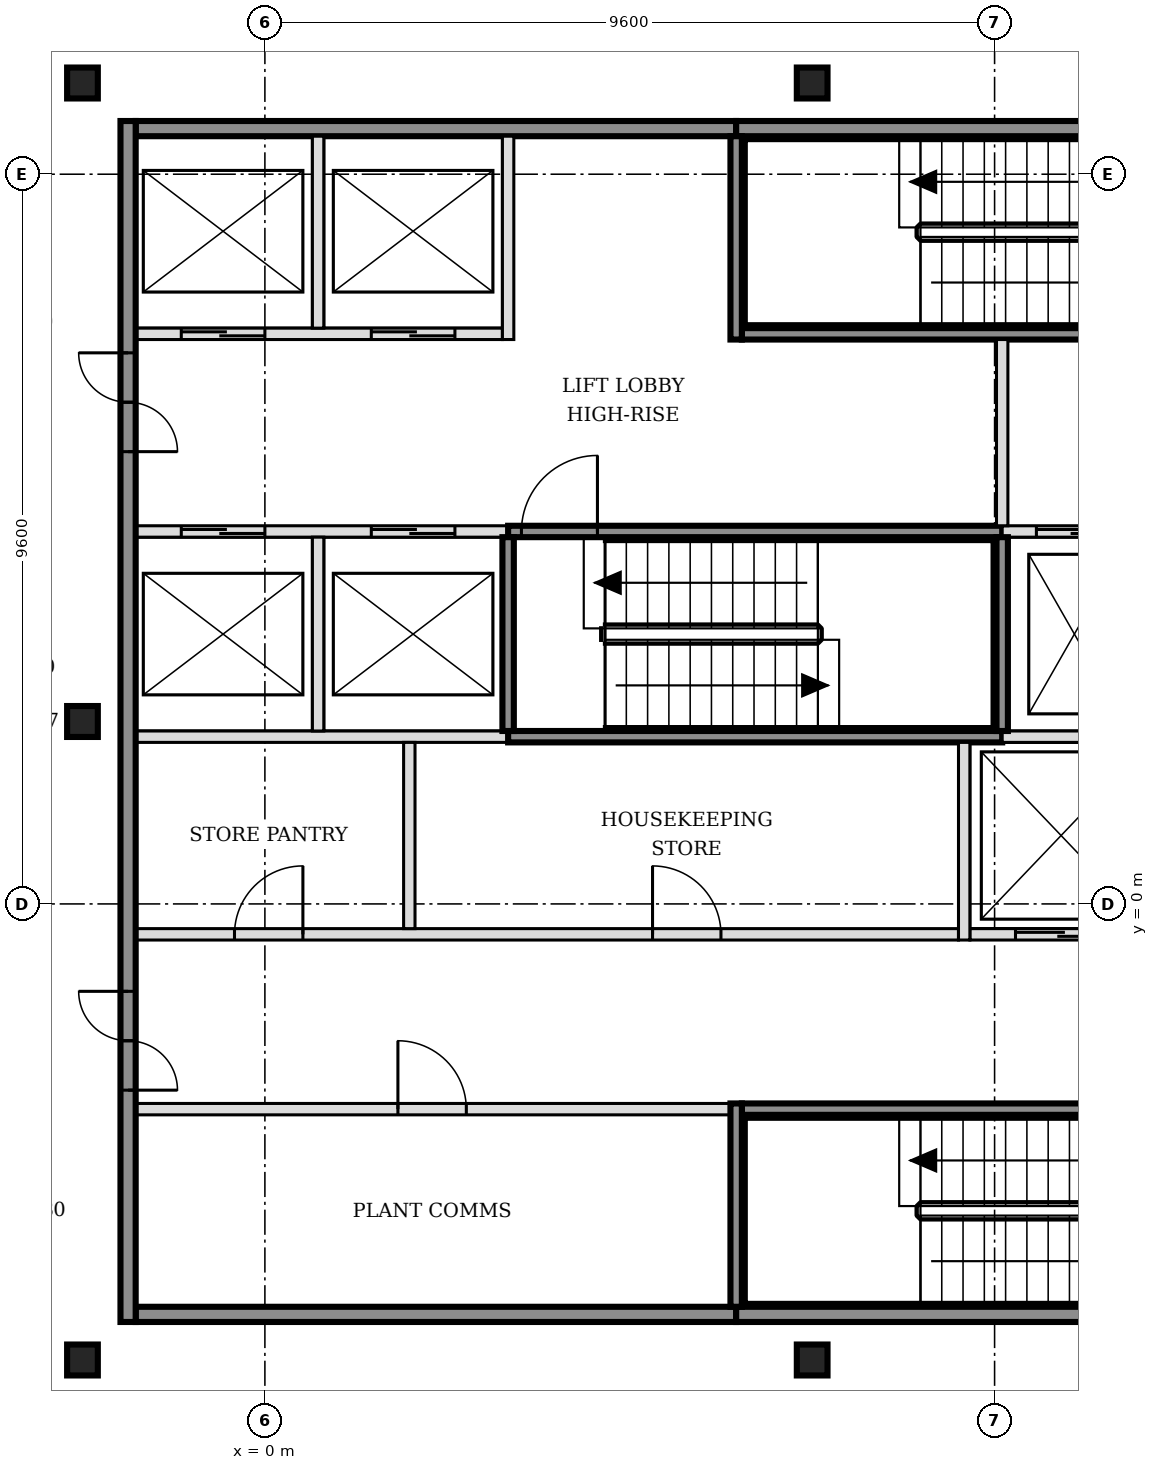
"""IFC4 building model, lengths in metres.
Left out: names, types, materials, properties, quantities, classifications, styles, units other than length and angle.
Written with IfcOpenShell. Run it as: python <this file> out.ifc"""

import sys

from ifc_helpers import new_model, si_unit, direction, frame, frame_2d, origin, origin_2d, place, context, subcontext, project, spatial, rectangle, i_section, extrude, element, fill, save


model = new_model("IFC4")
c1 = context("Model", 3, precision=1e-05, world=origin(), true_north=direction((0.0, 1.0)))
c2 = subcontext(c1, "Body", "Model", "MODEL_VIEW")
j1 = project(units=[si_unit("LENGTHUNIT", "METRE"), si_unit("PLANEANGLEUNIT", "RADIAN")], contexts=[c1])
p1 = place(None, origin())
s1 = spatial("IfcSite", under=j1, at=p1, CompositionType="ELEMENT")
p2 = place(p1, origin())
s2 = spatial("IfcBuilding", under=s1, at=p2, CompositionType="ELEMENT")
p3 = place(p2, frame((0.0, 0.0, 214.2)))
s3 = spatial("IfcBuildingStorey", under=s2, at=p3, CompositionType="ELEMENT", Elevation=214.2)
for number, where, z_axis, x_axis in (
    (1, (-2.4, -6.0, -0.15), (0.0, 0.0, 1.0), (1.0, 0.0, 0.0)),
    (2, (7.2, -6.0, -0.15), (0.0, 0.0, 1.0), (1.0, 0.0, 0.0)),
    (3, (-2.4, 2.4, -0.15), (0.0, 0.0, 1.0), (1.0, 0.0, 0.0)),
    (4, (-2.4, 10.8, -0.15), (0.0, 0.0, 1.0), (1.0, 0.0, 0.0)),
    (5, (7.2, 10.8, -0.15), (0.0, 0.0, 1.0), (1.0, 0.0, 0.0)),
):
    element("IfcColumn", number, at=place(p3, frame(where, z_axis=z_axis, x_axis=x_axis)), inside=s3, PredefinedType="COLUMN", context=c2, shape_type="SweptSolid", body=[
        extrude(i_section(OverallWidth=0.404, OverallDepth=0.407, WebThickness=0.027, FlangeThickness=0.044, FilletRadius=0.015, at=origin_2d()), origin(), (0.0, 0.0, 1.0), 3.6),
    ])
p4 = place(p3, frame((-1.7, -5.4, 0.0), z_axis=(0.0, 0.0, 1.0), x_axis=(1.0, 0.0, 0.0)))
e6 = element("IfcWall", 6, at=p4, inside=s3, PredefinedType="SOLIDWALL", context=c2, shape_type="SweptSolid", body=[
    extrude(rectangle(XDim=7.9, YDim=0.2, at=frame_2d((3.95, 0.0))), origin(), (0.0, 0.0, 1.0), 3.45),
])
p5 = place(p3, frame((6.2, -5.4, 0.0), z_axis=(0.0, 0.0, 1.0), x_axis=(1.0, 0.0, 0.0)))
e7 = element("IfcWall", 7, at=p5, inside=s3, PredefinedType="SOLIDWALL", context=c2, shape_type="SweptSolid", body=[
    extrude(rectangle(XDim=6.5, YDim=0.2, at=frame_2d((3.25, 0.0))), origin(), (0.0, 0.0, 1.0), 3.45),
])
p6 = place(p3, frame((-1.7, -2.7, 0.0), z_axis=(0.0, 0.0, 1.0), x_axis=(1.0, 0.0, 0.0)))
e8 = element("IfcWall", 8, at=p6, inside=s3, PredefinedType="PARTITIONING", context=c2, shape_type="SweptSolid", body=[
    extrude(rectangle(XDim=7.825, YDim=0.15, at=frame_2d((3.913, 0.0))), origin(), (0.0, 0.0, 1.0), 3.45),
])
p7 = place(p6, frame((3.45, 0.0, 0.0)))
e9 = element("IfcOpeningElement", 9, at=p7, cuts=e8, PredefinedType="OPENING", context=c2, shape_type="SweptSolid", body=[
    extrude(rectangle(XDim=0.9, YDim=2.1, at=frame_2d((0.45, 1.05))), frame((0.0, 0.085, 0.0), z_axis=(0.0, -1.0, 0.0), x_axis=(1.0, 0.0, 0.0)), (0.0, 0.0, 1.0), 0.17),
])
p8 = place(p3, frame((6.275, -2.7, 0.0), z_axis=(0.0, 0.0, 1.0), x_axis=(1.0, 0.0, 0.0)))
e10 = element("IfcWall", 10, at=p8, inside=s3, PredefinedType="SOLIDWALL", context=c2, shape_type="SweptSolid", body=[
    extrude(rectangle(XDim=6.35, YDim=0.15, at=frame_2d((3.175, 0.0))), origin(), (0.0, 0.0, 1.0), 3.45),
])
p9 = place(p8, frame((5.225, 0.0, 0.0)))
e11 = element("IfcOpeningElement", 11, at=p9, cuts=e10, PredefinedType="OPENING", context=c2, shape_type="SweptSolid", body=[
    extrude(rectangle(XDim=1.0, YDim=2.1, at=frame_2d((0.5, 1.05))), frame((0.0, 0.085, 0.0), z_axis=(0.0, -1.0, 0.0), x_axis=(1.0, 0.0, 0.0)), (0.0, 0.0, 1.0), 0.17),
])
p10 = place(p3, frame((-1.7, -0.4, 0.0), z_axis=(0.0, 0.0, 1.0), x_axis=(1.0, 0.0, 0.0)))
e12 = element("IfcWall", 12, at=p10, inside=s3, PredefinedType="PARTITIONING", context=c2, shape_type="SweptSolid", body=[
    extrude(rectangle(XDim=10.825, YDim=0.15, at=frame_2d((5.413, 0.0))), origin(), (0.0, 0.0, 1.0), 3.45),
])
p11 = place(p10, frame((1.3, 0.0, 0.0)))
e13 = element("IfcOpeningElement", 13, at=p11, cuts=e12, PredefinedType="OPENING", context=c2, shape_type="SweptSolid", body=[
    extrude(rectangle(XDim=0.9, YDim=2.1, at=frame_2d((0.45, 1.05))), frame((0.0, 0.085, 0.0), z_axis=(0.0, -1.0, 0.0), x_axis=(1.0, 0.0, 0.0)), (0.0, 0.0, 1.0), 0.17),
])
p12 = place(p10, frame((6.8, 0.0, 0.0)))
e14 = element("IfcOpeningElement", 14, at=p12, cuts=e12, PredefinedType="OPENING", context=c2, shape_type="SweptSolid", body=[
    extrude(rectangle(XDim=0.9, YDim=2.1, at=frame_2d((0.45, 1.05))), frame((0.0, 0.085, 0.0), z_axis=(0.0, -1.0, 0.0), x_axis=(1.0, 0.0, 0.0)), (0.0, 0.0, 1.0), 0.17),
])
p13 = place(p3, frame((9.275, -0.4, 0.0), z_axis=(0.0, 0.0, 1.0), x_axis=(1.0, 0.0, 0.0)))
e15 = element("IfcWall", 15, at=p13, inside=s3, PredefinedType="SOLIDWALL", context=c2, shape_type="SweptSolid", body=[
    extrude(rectangle(XDim=4.95, YDim=0.15, at=frame_2d((2.475, 0.0))), origin(), (0.0, 0.0, 1.0), 3.45),
])
p14 = place(p13, frame((0.6, 0.0, 0.0)))
e16 = element("IfcOpeningElement", 16, at=p14, cuts=e15, PredefinedType="OPENING", context=c2, shape_type="SweptSolid", body=[
    extrude(rectangle(XDim=1.2, YDim=2.1, at=frame_2d((0.6, 1.05))), frame((0.0, 0.085, 0.0), z_axis=(0.0, -1.0, 0.0), x_axis=(1.0, 0.0, 0.0)), (0.0, 0.0, 1.0), 0.17),
])
p15 = place(p13, frame((3.15, 0.0, 0.0)))
e17 = element("IfcOpeningElement", 17, at=p15, cuts=e15, PredefinedType="OPENING", context=c2, shape_type="SweptSolid", body=[
    extrude(rectangle(XDim=1.2, YDim=2.1, at=frame_2d((0.6, 1.05))), frame((0.0, 0.085, 0.0), z_axis=(0.0, -1.0, 0.0), x_axis=(1.0, 0.0, 0.0)), (0.0, 0.0, 1.0), 0.17),
])
p16 = place(p3, frame((-1.7, 2.2, 0.0), z_axis=(0.0, 0.0, 1.0), x_axis=(1.0, 0.0, 0.0)))
e18 = element("IfcWall", 18, at=p16, inside=s3, PredefinedType="SOLIDWALL", context=c2, shape_type="SweptSolid", body=[
    extrude(rectangle(XDim=4.9, YDim=0.15, at=frame_2d((2.45, 0.0))), origin(), (0.0, 0.0, 1.0), 3.45),
])
p17 = place(p3, frame((3.2, 2.2, 0.0), z_axis=(0.0, 0.0, 1.0), x_axis=(1.0, 0.0, 0.0)))
e19 = element("IfcWall", 19, at=p17, inside=s3, PredefinedType="SOLIDWALL", context=c2, shape_type="SweptSolid", body=[
    extrude(rectangle(XDim=6.5, YDim=0.15, at=frame_2d((3.25, 0.0))), origin(), (0.0, 0.0, 1.0), 3.45),
])
p18 = place(p3, frame((9.7, 2.2, 0.0), z_axis=(0.0, 0.0, 1.0), x_axis=(1.0, 0.0, 0.0)))
e20 = element("IfcWall", 20, at=p18, inside=s3, PredefinedType="SOLIDWALL", context=c2, shape_type="SweptSolid", body=[
    extrude(rectangle(XDim=4.525, YDim=0.15, at=frame_2d((2.263, 0.0))), origin(), (0.0, 0.0, 1.0), 3.45),
])
p19 = place(p3, frame((-1.7, 4.9, 0.0), z_axis=(0.0, 0.0, 1.0), x_axis=(1.0, 0.0, 0.0)))
e21 = element("IfcWall", 21, at=p19, inside=s3, PredefinedType="SOLIDWALL", context=c2, shape_type="SweptSolid", body=[
    extrude(rectangle(XDim=4.9, YDim=0.15, at=frame_2d((2.45, 0.0))), origin(), (0.0, 0.0, 1.0), 3.45),
])
p20 = place(p19, frame((0.6, 0.0, 0.0)))
e22 = element("IfcOpeningElement", 22, at=p20, cuts=e21, PredefinedType="OPENING", context=c2, shape_type="SweptSolid", body=[
    extrude(rectangle(XDim=1.1, YDim=2.1, at=frame_2d((0.55, 1.05))), frame((0.0, 0.085, 0.0), z_axis=(0.0, -1.0, 0.0), x_axis=(1.0, 0.0, 0.0)), (0.0, 0.0, 1.0), 0.17),
])
p21 = place(p19, frame((3.1, 0.0, 0.0)))
e23 = element("IfcOpeningElement", 23, at=p21, cuts=e21, PredefinedType="OPENING", context=c2, shape_type="SweptSolid", body=[
    extrude(rectangle(XDim=1.1, YDim=2.1, at=frame_2d((0.55, 1.05))), frame((0.0, 0.085, 0.0), z_axis=(0.0, -1.0, 0.0), x_axis=(1.0, 0.0, 0.0)), (0.0, 0.0, 1.0), 0.17),
])
p22 = place(p3, frame((3.2, 4.9, 0.0), z_axis=(0.0, 0.0, 1.0), x_axis=(1.0, 0.0, 0.0)))
e24 = element("IfcWall", 24, at=p22, inside=s3, PredefinedType="SOLIDWALL", context=c2, shape_type="SweptSolid", body=[
    extrude(rectangle(XDim=6.5, YDim=0.15, at=frame_2d((3.25, 0.0))), origin(), (0.0, 0.0, 1.0), 3.45),
])
p23 = place(p22, frame((0.175, 0.0, 0.0)))
e25 = element("IfcOpeningElement", 25, at=p23, cuts=e24, PredefinedType="OPENING", context=c2, shape_type="SweptSolid", body=[
    extrude(rectangle(XDim=1.0, YDim=2.1, at=frame_2d((0.5, 1.05))), frame((0.0, 0.085, 0.0), z_axis=(0.0, -1.0, 0.0), x_axis=(1.0, 0.0, 0.0)), (0.0, 0.0, 1.0), 0.17),
])
p24 = place(p3, frame((9.7, 4.9, 0.0), z_axis=(0.0, 0.0, 1.0), x_axis=(1.0, 0.0, 0.0)))
e26 = element("IfcWall", 26, at=p24, inside=s3, PredefinedType="SOLIDWALL", context=c2, shape_type="SweptSolid", body=[
    extrude(rectangle(XDim=6.4, YDim=0.15, at=frame_2d((3.2, 0.0))), origin(), (0.0, 0.0, 1.0), 3.45),
])
p25 = place(p24, frame((0.45, 0.0, 0.0)))
e27 = element("IfcOpeningElement", 27, at=p25, cuts=e26, PredefinedType="OPENING", context=c2, shape_type="SweptSolid", body=[
    extrude(rectangle(XDim=1.0, YDim=2.1, at=frame_2d((0.5, 1.05))), frame((0.0, 0.085, 0.0), z_axis=(0.0, -1.0, 0.0), x_axis=(1.0, 0.0, 0.0)), (0.0, 0.0, 1.0), 0.17),
])
p26 = place(p24, frame((2.35, 0.0, 0.0)))
e28 = element("IfcOpeningElement", 28, at=p26, cuts=e26, PredefinedType="OPENING", context=c2, shape_type="SweptSolid", body=[
    extrude(rectangle(XDim=1.0, YDim=2.1, at=frame_2d((0.5, 1.05))), frame((0.0, 0.085, 0.0), z_axis=(0.0, -1.0, 0.0), x_axis=(1.0, 0.0, 0.0)), (0.0, 0.0, 1.0), 0.17),
])
p27 = place(p24, frame((4.7, 0.0, 0.0)))
e29 = element("IfcOpeningElement", 29, at=p27, cuts=e26, PredefinedType="OPENING", context=c2, shape_type="SweptSolid", body=[
    extrude(rectangle(XDim=0.9, YDim=2.1, at=frame_2d((0.45, 1.05))), frame((0.0, 0.085, 0.0), z_axis=(0.0, -1.0, 0.0), x_axis=(1.0, 0.0, 0.0)), (0.0, 0.0, 1.0), 0.17),
])
p28 = place(p3, frame((-1.7, 7.5, 0.0), z_axis=(0.0, 0.0, 1.0), x_axis=(1.0, 0.0, 0.0)))
e30 = element("IfcWall", 30, at=p28, inside=s3, PredefinedType="SOLIDWALL", context=c2, shape_type="SweptSolid", body=[
    extrude(rectangle(XDim=4.825, YDim=0.15, at=frame_2d((2.413, 0.0))), origin(), (0.0, 0.0, 1.0), 3.45),
])
p29 = place(p28, frame((0.6, 0.0, 0.0)))
e31 = element("IfcOpeningElement", 31, at=p29, cuts=e30, PredefinedType="OPENING", context=c2, shape_type="SweptSolid", body=[
    extrude(rectangle(XDim=1.1, YDim=2.1, at=frame_2d((0.55, 1.05))), frame((0.0, 0.085, 0.0), z_axis=(0.0, -1.0, 0.0), x_axis=(1.0, 0.0, 0.0)), (0.0, 0.0, 1.0), 0.17),
])
p30 = place(p28, frame((3.1, 0.0, 0.0)))
e32 = element("IfcOpeningElement", 32, at=p30, cuts=e30, PredefinedType="OPENING", context=c2, shape_type="SweptSolid", body=[
    extrude(rectangle(XDim=1.1, YDim=2.1, at=frame_2d((0.55, 1.05))), frame((0.0, 0.085, 0.0), z_axis=(0.0, -1.0, 0.0), x_axis=(1.0, 0.0, 0.0)), (0.0, 0.0, 1.0), 0.17),
])
p31 = place(p3, frame((6.275, 7.5, 0.0), z_axis=(0.0, 0.0, 1.0), x_axis=(1.0, 0.0, 0.0)))
e33 = element("IfcWall", 33, at=p31, inside=s3, PredefinedType="SOLIDWALL", context=c2, shape_type="SweptSolid", body=[
    extrude(rectangle(XDim=6.425, YDim=0.15, at=frame_2d((3.212, 0.0))), origin(), (0.0, 0.0, 1.0), 3.45),
])
p32 = place(p31, frame((5.225, 0.0, 0.0)))
e34 = element("IfcOpeningElement", 34, at=p32, cuts=e33, PredefinedType="OPENING", context=c2, shape_type="SweptSolid", body=[
    extrude(rectangle(XDim=1.0, YDim=2.1, at=frame_2d((0.5, 1.05))), frame((0.0, 0.085, 0.0), z_axis=(0.0, -1.0, 0.0), x_axis=(1.0, 0.0, 0.0)), (0.0, 0.0, 1.0), 0.17),
])
p33 = place(p3, frame((-1.7, 10.2, 0.0), z_axis=(0.0, 0.0, 1.0), x_axis=(1.0, 0.0, 0.0)))
e35 = element("IfcWall", 35, at=p33, inside=s3, PredefinedType="SOLIDWALL", context=c2, shape_type="SweptSolid", body=[
    extrude(rectangle(XDim=7.9, YDim=0.2, at=frame_2d((3.95, 0.0))), origin(), (0.0, 0.0, 1.0), 3.45),
])
p34 = place(p3, frame((6.2, 10.2, 0.0), z_axis=(0.0, 0.0, 1.0), x_axis=(1.0, 0.0, 0.0)))
e36 = element("IfcWall", 36, at=p34, inside=s3, PredefinedType="SOLIDWALL", context=c2, shape_type="SweptSolid", body=[
    extrude(rectangle(XDim=6.5, YDim=0.2, at=frame_2d((3.25, 0.0))), origin(), (0.0, 0.0, 1.0), 3.45),
])
p35 = place(p3, frame((-1.8, -5.5, 0.0), z_axis=(0.0, 0.0, 1.0), x_axis=(0.0, 1.0, 0.0)))
e37 = element("IfcWall", 37, at=p35, inside=s3, PredefinedType="SOLIDWALL", context=c2, shape_type="SweptSolid", body=[
    extrude(rectangle(XDim=15.8, YDim=0.2, at=frame_2d((7.9, 0.0))), origin(), (0.0, 0.0, 1.0), 3.45),
])
p36 = place(p35, frame((3.05, 0.0, 0.0)))
e38 = element("IfcOpeningElement", 38, at=p36, cuts=e37, PredefinedType="OPENING", context=c2, shape_type="SweptSolid", body=[
    extrude(rectangle(XDim=1.3, YDim=2.1, at=frame_2d((0.65, 1.05))), frame((0.0, 0.11, 0.0), z_axis=(0.0, -1.0, 0.0), x_axis=(1.0, 0.0, 0.0)), (0.0, 0.0, 1.0), 0.22),
])
p37 = place(p35, frame((11.45, 0.0, 0.0)))
e39 = element("IfcOpeningElement", 39, at=p37, cuts=e37, PredefinedType="OPENING", context=c2, shape_type="SweptSolid", body=[
    extrude(rectangle(XDim=1.3, YDim=2.1, at=frame_2d((0.65, 1.05))), frame((0.0, 0.11, 0.0), z_axis=(0.0, -1.0, 0.0), x_axis=(1.0, 0.0, 0.0)), (0.0, 0.0, 1.0), 0.22),
])
p38 = place(p3, frame((0.7, 2.275, 0.0), z_axis=(0.0, 0.0, 1.0), x_axis=(0.0, 1.0, 0.0)))
e40 = element("IfcWall", 40, at=p38, inside=s3, PredefinedType="SOLIDWALL", context=c2, shape_type="SweptSolid", body=[
    extrude(rectangle(XDim=2.55, YDim=0.15, at=frame_2d((1.275, 0.0))), origin(), (0.0, 0.0, 1.0), 3.45),
])
p39 = place(p3, frame((0.7, 7.575, 0.0), z_axis=(0.0, 0.0, 1.0), x_axis=(0.0, 1.0, 0.0)))
e41 = element("IfcWall", 41, at=p39, inside=s3, PredefinedType="SOLIDWALL", context=c2, shape_type="SweptSolid", body=[
    extrude(rectangle(XDim=2.525, YDim=0.15, at=frame_2d((1.263, 0.0))), origin(), (0.0, 0.0, 1.0), 3.45),
])
p40 = place(p3, frame((1.9, -0.325, 0.0), z_axis=(0.0, 0.0, 1.0), x_axis=(0.0, 1.0, 0.0)))
e42 = element("IfcWall", 42, at=p40, inside=s3, PredefinedType="PARTITIONING", context=c2, shape_type="SweptSolid", body=[
    extrude(rectangle(XDim=2.45, YDim=0.15, at=frame_2d((1.225, 0.0))), origin(), (0.0, 0.0, 1.0), 3.45),
])
p41 = place(p3, frame((3.2, 2.275, 0.0), z_axis=(0.0, 0.0, 1.0), x_axis=(0.0, 1.0, 0.0)))
e43 = element("IfcWall", 43, at=p41, inside=s3, PredefinedType="SOLIDWALL", context=c2, shape_type="SweptSolid", body=[
    extrude(rectangle(XDim=2.55, YDim=0.15, at=frame_2d((1.275, 0.0))), origin(), (0.0, 0.0, 1.0), 3.45),
])
for number, where, z_axis, x_axis in (
    (44, (3.2, 7.425, 0.0), (0.0, 0.0, 1.0), (0.0, 1.0, 0.0)),
    (45, (6.2, -5.3, 0.0), (0.0, 0.0, 1.0), (0.0, 1.0, 0.0)),
    (46, (6.2, 7.425, 0.0), (0.0, 0.0, 1.0), (0.0, 1.0, 0.0)),
):
    element("IfcWall", number, at=place(p3, frame(where, z_axis=z_axis, x_axis=x_axis)), inside=s3, PredefinedType="SOLIDWALL", context=c2, shape_type="SweptSolid", body=[
        extrude(rectangle(XDim=2.675, YDim=0.15, at=frame_2d((1.337, 0.0))), origin(), (0.0, 0.0, 1.0), 3.45),
    ])
p42 = place(p3, frame((9.2, -0.475, 0.0), z_axis=(0.0, 0.0, 1.0), x_axis=(0.0, 1.0, 0.0)))
e47 = element("IfcWall", 47, at=p42, inside=s3, PredefinedType="SOLIDWALL", context=c2, shape_type="SweptSolid", body=[
    extrude(rectangle(XDim=2.6, YDim=0.15, at=frame_2d((1.3, 0.0))), origin(), (0.0, 0.0, 1.0), 3.45),
])
p43 = place(p3, frame((9.7, 2.275, 0.0), z_axis=(0.0, 0.0, 1.0), x_axis=(0.0, 1.0, 0.0)))
e48 = element("IfcWall", 48, at=p43, inside=s3, PredefinedType="SOLIDWALL", context=c2, shape_type="SweptSolid", body=[
    extrude(rectangle(XDim=2.55, YDim=0.15, at=frame_2d((1.275, 0.0))), origin(), (0.0, 0.0, 1.0), 3.45),
])
p44 = place(p3, frame((9.7, 4.975, 0.0), z_axis=(0.0, 0.0, 1.0), x_axis=(0.0, 1.0, 0.0)))
e49 = element("IfcWall", 49, at=p44, inside=s3, PredefinedType="SOLIDWALL", context=c2, shape_type="SweptSolid", body=[
    extrude(rectangle(XDim=2.45, YDim=0.15, at=frame_2d((1.225, 0.0))), origin(), (0.0, 0.0, 1.0), 3.45),
])
p45 = place(p14, origin())
e50 = element("IfcDoor", 50, at=p45, inside=s3, OperationType="DOUBLE_DOOR_SLIDING", PredefinedType="DOOR", context=c2, shape_type="SweptSolid", body=[
    extrude(rectangle(XDim=1.2, YDim=2.1, at=frame_2d((0.6, 1.05))), frame((0.0, 0.025, 0.0), z_axis=(0.0, -1.0, 0.0), x_axis=(1.0, 0.0, 0.0)), (0.0, 0.0, 1.0), 0.05),
])
fill(e16, e50)
p46 = place(p20, origin())
e51 = element("IfcDoor", 51, at=p46, inside=s3, OperationType="DOUBLE_DOOR_SLIDING", PredefinedType="DOOR", context=c2, shape_type="SweptSolid", body=[
    extrude(rectangle(XDim=1.1, YDim=2.1, at=frame_2d((0.55, 1.05))), frame((0.0, 0.025, 0.0), z_axis=(0.0, -1.0, 0.0), x_axis=(1.0, 0.0, 0.0)), (0.0, 0.0, 1.0), 0.05),
])
fill(e22, e51)
p47 = place(p21, origin())
e52 = element("IfcDoor", 52, at=p47, inside=s3, OperationType="DOUBLE_DOOR_SLIDING", PredefinedType="DOOR", context=c2, shape_type="SweptSolid", body=[
    extrude(rectangle(XDim=1.1, YDim=2.1, at=frame_2d((0.55, 1.05))), frame((0.0, 0.025, 0.0), z_axis=(0.0, -1.0, 0.0), x_axis=(1.0, 0.0, 0.0)), (0.0, 0.0, 1.0), 0.05),
])
fill(e23, e52)
p48 = place(p29, origin())
e53 = element("IfcDoor", 53, at=p48, inside=s3, OperationType="DOUBLE_DOOR_SLIDING", PredefinedType="DOOR", context=c2, shape_type="SweptSolid", body=[
    extrude(rectangle(XDim=1.1, YDim=2.1, at=frame_2d((0.55, 1.05))), frame((0.0, 0.025, 0.0), z_axis=(0.0, -1.0, 0.0), x_axis=(1.0, 0.0, 0.0)), (0.0, 0.0, 1.0), 0.05),
])
fill(e31, e53)
p49 = place(p30, origin())
e54 = element("IfcDoor", 54, at=p49, inside=s3, OperationType="DOUBLE_DOOR_SLIDING", PredefinedType="DOOR", context=c2, shape_type="SweptSolid", body=[
    extrude(rectangle(XDim=1.1, YDim=2.1, at=frame_2d((0.55, 1.05))), frame((0.0, 0.025, 0.0), z_axis=(0.0, -1.0, 0.0), x_axis=(1.0, 0.0, 0.0)), (0.0, 0.0, 1.0), 0.05),
])
fill(e32, e54)
p50 = place(p25, origin())
e55 = element("IfcDoor", 55, at=p50, inside=s3, OperationType="DOUBLE_DOOR_SLIDING", PredefinedType="DOOR", context=c2, shape_type="SweptSolid", body=[
    extrude(rectangle(XDim=1.0, YDim=2.1, at=frame_2d((0.5, 1.05))), frame((0.0, 0.025, 0.0), z_axis=(0.0, -1.0, 0.0), x_axis=(1.0, 0.0, 0.0)), (0.0, 0.0, 1.0), 0.05),
])
fill(e27, e55)
p51 = place(p23, origin())
e56 = element("IfcDoor", 56, at=p51, inside=s3, OperationType="SINGLE_SWING_RIGHT", PredefinedType="DOOR", context=c2, shape_type="SweptSolid", body=[
    extrude(rectangle(XDim=1.0, YDim=2.1, at=frame_2d((0.5, 1.05))), frame((0.0, 0.025, 0.0), z_axis=(0.0, -1.0, 0.0), x_axis=(1.0, 0.0, 0.0)), (0.0, 0.0, 1.0), 0.05),
])
fill(e25, e56)
p52 = place(p36, origin())
e57 = element("IfcDoor", 57, at=p52, inside=s3, OperationType="DOUBLE_DOOR_SINGLE_SWING", PredefinedType="DOOR", context=c2, shape_type="SweptSolid", body=[
    extrude(rectangle(XDim=1.3, YDim=2.1, at=frame_2d((0.65, 1.05))), frame((0.0, 0.025, 0.0), z_axis=(0.0, -1.0, 0.0), x_axis=(1.0, 0.0, 0.0)), (0.0, 0.0, 1.0), 0.05),
])
fill(e38, e57)
p53 = place(p37, origin())
e58 = element("IfcDoor", 58, at=p53, inside=s3, OperationType="DOUBLE_DOOR_SINGLE_SWING", PredefinedType="DOOR", context=c2, shape_type="SweptSolid", body=[
    extrude(rectangle(XDim=1.3, YDim=2.1, at=frame_2d((0.65, 1.05))), frame((0.0, 0.025, 0.0), z_axis=(0.0, -1.0, 0.0), x_axis=(1.0, 0.0, 0.0)), (0.0, 0.0, 1.0), 0.05),
])
fill(e39, e58)
p54 = place(p7, origin())
e59 = element("IfcDoor", 59, at=p54, inside=s3, OperationType="SINGLE_SWING_LEFT", PredefinedType="DOOR", context=c2, shape_type="SweptSolid", body=[
    extrude(rectangle(XDim=0.9, YDim=2.1, at=frame_2d((0.45, 1.05))), frame((0.0, 0.025, 0.0), z_axis=(0.0, -1.0, 0.0), x_axis=(1.0, 0.0, 0.0)), (0.0, 0.0, 1.0), 0.05),
])
fill(e9, e59)
p55 = place(p11, origin())
e60 = element("IfcDoor", 60, at=p55, inside=s3, OperationType="SINGLE_SWING_RIGHT", PredefinedType="DOOR", context=c2, shape_type="SweptSolid", body=[
    extrude(rectangle(XDim=0.9, YDim=2.1, at=frame_2d((0.45, 1.05))), frame((0.0, 0.025, 0.0), z_axis=(0.0, -1.0, 0.0), x_axis=(1.0, 0.0, 0.0)), (0.0, 0.0, 1.0), 0.05),
])
fill(e13, e60)
p56 = place(p12, origin())
e61 = element("IfcDoor", 61, at=p56, inside=s3, OperationType="SINGLE_SWING_LEFT", PredefinedType="DOOR", context=c2, shape_type="SweptSolid", body=[
    extrude(rectangle(XDim=0.9, YDim=2.1, at=frame_2d((0.45, 1.05))), frame((0.0, 0.025, 0.0), z_axis=(0.0, -1.0, 0.0), x_axis=(1.0, 0.0, 0.0)), (0.0, 0.0, 1.0), 0.05),
])
fill(e14, e61)
save(model, sys.argv[1])
